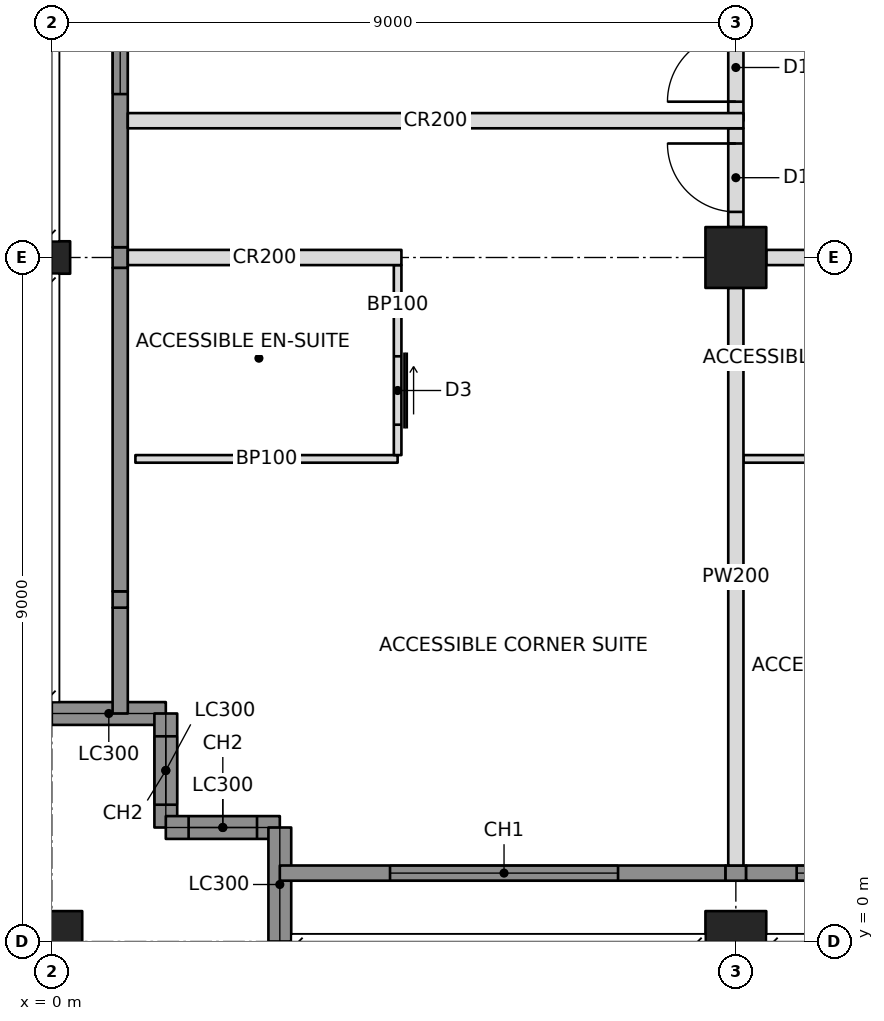
"""IFC4 building model, lengths in metres.
Left out: names, types, materials, properties, quantities, classifications, styles, units other than length and angle.
Written with IfcOpenShell. Run it as: python <this file> out.ifc"""

import sys

from ifc_helpers import new_model, si_unit, direction, frame, frame_2d, origin, origin_with_axes, origin_2d, place, context, subcontext, project, spatial, rectangle, hollow_rectangle, i_section, extrude, element, fill, save


model = new_model("IFC4")
c1 = context("Model", 3, precision=1e-05, world=origin(), true_north=direction((0.0, 1.0)))
c2 = subcontext(c1, "Body", "Model", "MODEL_VIEW")
j1 = project(units=[si_unit("LENGTHUNIT", "METRE"), si_unit("PLANEANGLEUNIT", "RADIAN")], contexts=[c1])
p1 = place(None, origin())
s1 = spatial("IfcSite", under=j1, at=p1, CompositionType="ELEMENT")
p2 = place(p1, origin())
s2 = spatial("IfcBuilding", under=s1, at=p2, CompositionType="ELEMENT")
p3 = place(p2, frame((0.0, 0.0, 197.8)))
s3 = spatial("IfcBuildingStorey", under=s2, at=p3, CompositionType="ELEMENT", Elevation=197.8)
p4 = place(p3, origin_with_axes())
e1 = element("IfcColumn", 1, at=p4, inside=s3, PredefinedType="COLUMN", context=c2, shape_type="SweptSolid", body=[
    extrude(hollow_rectangle(XDim=0.8, YDim=0.8, WallThickness=0.06, at=origin_2d()), origin(), (0.0, 0.0, 1.0), 3.4),
])
p5 = place(p3, frame((0.0, 9.0, 0.0), z_axis=(0.0, 0.0, 1.0), x_axis=(0.0, 1.0, 0.0)))
e2 = element("IfcColumn", 2, at=p5, inside=s3, PredefinedType="COLUMN", context=c2, shape_type="SweptSolid", body=[
    extrude(i_section(OverallWidth=0.427, OverallDepth=0.483, WebThickness=0.051, FlangeThickness=0.082, at=origin_2d()), origin(), (0.0, 0.0, 1.0), 3.4),
])
p6 = place(p3, frame((9.0, 0.0, 0.0), z_axis=(0.0, 0.0, 1.0), x_axis=(1.0, 0.0, 0.0)))
e3 = element("IfcColumn", 3, at=p6, inside=s3, PredefinedType="COLUMN", context=c2, shape_type="SweptSolid", body=[
    extrude(hollow_rectangle(XDim=0.8, YDim=0.8, WallThickness=0.06, at=origin_2d()), origin(), (0.0, 0.0, 1.0), 3.4),
])
p7 = place(p3, frame((9.0, 9.0, 0.0), z_axis=(0.0, 0.0, 1.0), x_axis=(1.0, 0.0, 0.0)))
e4 = element("IfcColumn", 4, at=p7, inside=s3, PredefinedType="COLUMN", context=c2, shape_type="SweptSolid", body=[
    extrude(hollow_rectangle(XDim=0.8, YDim=0.8, WallThickness=0.05, at=origin_2d()), origin(), (0.0, 0.0, 1.0), 3.4),
])
p8 = place(p3, frame((0.0, 3.0, 0.0), z_axis=(0.0, 0.0, 1.0), x_axis=(1.0, 0.0, 0.0)))
e5 = element("IfcWall", 5, at=p8, inside=s3, PredefinedType="SOLIDWALL", context=c2, shape_type="SweptSolid", body=[
    extrude(rectangle(XDim=1.5, YDim=0.3, at=frame_2d((0.75, 0.0))), origin(), (0.0, 0.0, 1.0), 2.42),
])
p9 = place(p3, frame((1.5, 3.0, 0.0), z_axis=(0.0, 0.0, 1.0), x_axis=(0.0, -1.0, 0.0)))
e6 = element("IfcWall", 6, at=p9, inside=s3, PredefinedType="SOLIDWALL", context=c2, shape_type="SweptSolid", body=[
    extrude(rectangle(XDim=1.5, YDim=0.3, at=frame_2d((0.75, 0.0))), origin(), (0.0, 0.0, 1.0), 3.2),
])
p10 = place(p9, frame((0.3, 0.0, 0.6)))
e7 = element("IfcOpeningElement", 7, at=p10, cuts=e6, PredefinedType="OPENING", context=c2, shape_type="SweptSolid", body=[
    extrude(rectangle(XDim=0.9, YDim=2.2, at=frame_2d((0.45, 1.1))), frame((0.0, 0.16, 0.0), z_axis=(0.0, -1.0, 0.0), x_axis=(1.0, 0.0, 0.0)), (0.0, 0.0, 1.0), 0.32),
])
p11 = place(p3, frame((1.5, 1.5, 0.0), z_axis=(0.0, 0.0, 1.0), x_axis=(1.0, 0.0, 0.0)))
e8 = element("IfcWall", 8, at=p11, inside=s3, PredefinedType="SOLIDWALL", context=c2, shape_type="SweptSolid", body=[
    extrude(rectangle(XDim=1.5, YDim=0.3, at=frame_2d((0.75, 0.0))), origin(), (0.0, 0.0, 1.0), 3.2),
])
p12 = place(p11, frame((0.3, 0.0, 0.6)))
e9 = element("IfcOpeningElement", 9, at=p12, cuts=e8, PredefinedType="OPENING", context=c2, shape_type="SweptSolid", body=[
    extrude(rectangle(XDim=0.9, YDim=2.2, at=frame_2d((0.45, 1.1))), frame((0.0, 0.16, 0.0), z_axis=(0.0, -1.0, 0.0), x_axis=(1.0, 0.0, 0.0)), (0.0, 0.0, 1.0), 0.32),
])
p13 = place(p3, frame((3.0, 1.5, 0.0), z_axis=(0.0, 0.0, 1.0), x_axis=(0.0, -1.0, 0.0)))
e10 = element("IfcWall", 10, at=p13, inside=s3, PredefinedType="SOLIDWALL", context=c2, shape_type="SweptSolid", body=[
    extrude(rectangle(XDim=1.5, YDim=0.3, at=frame_2d((0.75, 0.0))), origin(), (0.0, 0.0, 1.0), 2.42),
])
p14 = place(p3, frame((3.0, 0.9, 0.0), z_axis=(0.0, 0.0, 1.0), x_axis=(1.0, 0.0, 0.0)))
e11 = element("IfcWall", 11, at=p14, inside=s3, PredefinedType="SOLIDWALL", context=c2, shape_type="SweptSolid", body=[
    extrude(rectangle(XDim=5.865, YDim=0.2, at=frame_2d((2.932, 0.0))), origin(), (0.0, 0.0, 1.0), 3.2),
])
p15 = place(p14, frame((1.45, 0.0, 0.6)))
e12 = element("IfcOpeningElement", 12, at=p15, cuts=e11, PredefinedType="OPENING", context=c2, shape_type="SweptSolid", body=[
    extrude(rectangle(XDim=3.0, YDim=2.2, at=frame_2d((1.5, 1.1))), frame((0.0, 0.11, 0.0), z_axis=(0.0, -1.0, 0.0), x_axis=(1.0, 0.0, 0.0)), (0.0, 0.0, 1.0), 0.22),
])
p16 = place(p3, frame((0.9, 3.0, 0.0), z_axis=(0.0, 0.0, 1.0), x_axis=(0.0, 1.0, 0.0)))
e13 = element("IfcWall", 13, at=p16, inside=s3, PredefinedType="SOLIDWALL", context=c2, shape_type="SweptSolid", body=[
    extrude(rectangle(XDim=1.393, YDim=0.2, at=frame_2d((0.696, 0.0))), origin(), (0.0, 0.0, 1.0), 3.2),
])
p17 = place(p3, frame((1.0, 9.0, 0.0), z_axis=(0.0, 0.0, 1.0), x_axis=(1.0, 0.0, 0.0)))
e14 = element("IfcWall", 14, at=p17, inside=s3, PredefinedType="PARTITIONING", context=c2, shape_type="SweptSolid", body=[
    extrude(rectangle(XDim=3.6, YDim=0.2, at=frame_2d((1.8, 0.0))), origin(), (0.0, 0.0, 1.0), 2.438),
])
p18 = place(p3, frame((9.4, 9.0, 0.0), z_axis=(0.0, 0.0, 1.0), x_axis=(1.0, 0.0, 0.0)))
e15 = element("IfcWall", 15, at=p18, inside=s3, PredefinedType="PARTITIONING", context=c2, shape_type="SweptSolid", body=[
    extrude(rectangle(XDim=8.2, YDim=0.2, at=frame_2d((4.1, 0.0))), origin(), (0.0, 0.0, 1.0), 2.405),
])
p19 = place(p18, frame((2.95, 0.0, 0.0)))
e16 = element("IfcOpeningElement", 16, at=p19, cuts=e15, PredefinedType="OPENING", context=c2, shape_type="SweptSolid", body=[
    extrude(rectangle(XDim=0.9, YDim=2.1, at=frame_2d((0.45, 1.05))), frame((0.0, 0.11, 0.0), z_axis=(0.0, -1.0, 0.0), x_axis=(1.0, 0.0, 0.0)), (0.0, 0.0, 1.0), 0.22),
])
p20 = place(p18, frame((4.35, 0.0, 0.0)))
e17 = element("IfcOpeningElement", 17, at=p20, cuts=e15, PredefinedType="OPENING", context=c2, shape_type="SweptSolid", body=[
    extrude(rectangle(XDim=0.9, YDim=2.1, at=frame_2d((0.45, 1.05))), frame((0.0, 0.11, 0.0), z_axis=(0.0, -1.0, 0.0), x_axis=(1.0, 0.0, 0.0)), (0.0, 0.0, 1.0), 0.22),
])
p21 = place(p3, frame((9.0, 10.8, 0.0), z_axis=(0.0, 0.0, 1.0), x_axis=(0.0, 1.0, 0.0)))
e18 = element("IfcWall", 18, at=p21, inside=s3, PredefinedType="PARTITIONING", context=c2, shape_type="SweptSolid", body=[
    extrude(rectangle(XDim=6.8, YDim=0.2, at=frame_2d((3.4, 0.0))), origin(), (0.0, 0.0, 1.0), 2.405),
])
p22 = place(p21, frame((0.25, 0.0, 0.0)))
e19 = element("IfcOpeningElement", 19, at=p22, cuts=e18, PredefinedType="OPENING", context=c2, shape_type="SweptSolid", body=[
    extrude(rectangle(XDim=0.9, YDim=2.1, at=frame_2d((0.45, 1.05))), frame((0.0, 0.11, 0.0), z_axis=(0.0, -1.0, 0.0), x_axis=(1.0, 0.0, 0.0)), (0.0, 0.0, 1.0), 0.22),
])
p23 = place(p3, frame((1.0, 10.8, 0.0), z_axis=(0.0, 0.0, 1.0), x_axis=(1.0, 0.0, 0.0)))
e20 = element("IfcWall", 20, at=p23, inside=s3, PredefinedType="PARTITIONING", context=c2, shape_type="SweptSolid", body=[
    extrude(rectangle(XDim=8.1, YDim=0.2, at=frame_2d((4.05, 0.0))), origin(), (0.0, 0.0, 1.0), 2.404),
])
p24 = place(p3, frame((9.0, 8.6, 0.0), z_axis=(0.0, 0.0, 1.0), x_axis=(0.0, -1.0, 0.0)))
e21 = element("IfcWall", 21, at=p24, inside=s3, PredefinedType="PARTITIONING", context=c2, shape_type="SweptSolid", body=[
    extrude(rectangle(XDim=7.6, YDim=0.2, at=frame_2d((3.8, 0.0))), origin(), (0.0, 0.0, 1.0), 2.438),
])
p25 = place(p3, frame((1.1, 6.35, 0.0), z_axis=(0.0, 0.0, 1.0), x_axis=(1.0, 0.0, 0.0)))
e22 = element("IfcWall", 22, at=p25, inside=s3, PredefinedType="PARTITIONING", context=c2, shape_type="SweptSolid", body=[
    extrude(rectangle(XDim=3.45, YDim=0.1, at=frame_2d((1.725, 0.0))), origin(), (0.0, 0.0, 1.0), 3.2),
])
p26 = place(p3, frame((4.55, 8.9, 0.0), z_axis=(0.0, 0.0, 1.0), x_axis=(0.0, -1.0, 0.0)))
e23 = element("IfcWall", 23, at=p26, inside=s3, PredefinedType="PARTITIONING", context=c2, shape_type="SweptSolid", body=[
    extrude(rectangle(XDim=2.5, YDim=0.1, at=frame_2d((1.25, 0.0))), origin(), (0.0, 0.0, 1.0), 2.438),
])
p27 = place(p26, frame((1.2, 0.0, 0.0)))
e24 = element("IfcOpeningElement", 24, at=p27, cuts=e23, PredefinedType="OPENING", context=c2, shape_type="SweptSolid", body=[
    extrude(rectangle(XDim=0.9, YDim=2.1, at=frame_2d((0.45, 1.05))), frame((0.0, 0.06, 0.0), z_axis=(0.0, -1.0, 0.0), x_axis=(1.0, 0.0, 0.0)), (0.0, 0.0, 1.0), 0.12),
])
p28 = place(p3, frame((9.1, 6.35, 0.0), z_axis=(0.0, 0.0, 1.0), x_axis=(1.0, 0.0, 0.0)))
e25 = element("IfcWall", 25, at=p28, inside=s3, PredefinedType="PARTITIONING", context=c2, shape_type="SweptSolid", body=[
    extrude(rectangle(XDim=2.95, YDim=0.1, at=frame_2d((1.475, 0.0))), origin(), (0.0, 0.0, 1.0), 2.438),
])
p29 = place(p3, frame((9.0, 9.4, 0.0), z_axis=(0.0, 0.0, 1.0), x_axis=(0.0, 1.0, 0.0)))
e26 = element("IfcWall", 26, at=p29, inside=s3, PredefinedType="PARTITIONING", context=c2, shape_type="SweptSolid", body=[
    extrude(rectangle(XDim=1.3, YDim=0.2, at=frame_2d((0.65, 0.0))), origin(), (0.0, 0.0, 1.0), 2.405),
])
p30 = place(p29, frame((0.2, 0.0, 0.0)))
e27 = element("IfcOpeningElement", 27, at=p30, cuts=e26, PredefinedType="OPENING", context=c2, shape_type="SweptSolid", body=[
    extrude(rectangle(XDim=0.9, YDim=2.1, at=frame_2d((0.45, 1.05))), frame((0.0, 0.11, 0.0), z_axis=(0.0, -1.0, 0.0), x_axis=(1.0, 0.0, 0.0)), (0.0, 0.0, 1.0), 0.22),
])
p31 = place(p3, frame((8.865, 0.9, 0.0), z_axis=(0.0, 0.0, 1.0), x_axis=(1.0, 0.0, 0.0)))
e28 = element("IfcWall", 28, at=p31, inside=s3, PredefinedType="SOLIDWALL", context=c2, shape_type="SweptSolid", body=[
    extrude(rectangle(XDim=0.271, YDim=0.2, at=frame_2d((0.135, 0.0))), origin(), (0.0, 0.0, 1.0), 2.438),
])
p32 = place(p3, frame((9.135, 0.9, 0.0), z_axis=(0.0, 0.0, 1.0), x_axis=(1.0, 0.0, 0.0)))
e29 = element("IfcWall", 29, at=p32, inside=s3, PredefinedType="SOLIDWALL", context=c2, shape_type="SweptSolid", body=[
    extrude(rectangle(XDim=8.671, YDim=0.2, at=frame_2d((4.335, 0.0))), origin(), (0.0, 0.0, 1.0), 3.2),
])
p33 = place(p32, frame((0.665, 0.0, 0.6)))
e30 = element("IfcOpeningElement", 30, at=p33, cuts=e29, PredefinedType="OPENING", context=c2, shape_type="SweptSolid", body=[
    extrude(rectangle(XDim=3.0, YDim=2.2, at=frame_2d((1.5, 1.1))), frame((0.0, 0.11, 0.0), z_axis=(0.0, -1.0, 0.0), x_axis=(1.0, 0.0, 0.0)), (0.0, 0.0, 1.0), 0.22),
])
p34 = place(p32, frame((5.065, 0.0, 0.6)))
e31 = element("IfcOpeningElement", 31, at=p34, cuts=e29, PredefinedType="OPENING", context=c2, shape_type="SweptSolid", body=[
    extrude(rectangle(XDim=3.0, YDim=2.2, at=frame_2d((1.5, 1.1))), frame((0.0, 0.11, 0.0), z_axis=(0.0, -1.0, 0.0), x_axis=(1.0, 0.0, 0.0)), (0.0, 0.0, 1.0), 0.22),
])
p35 = place(p3, frame((0.9, 4.393, 0.0), z_axis=(0.0, 0.0, 1.0), x_axis=(0.0, 1.0, 0.0)))
e32 = element("IfcWall", 32, at=p35, inside=s3, PredefinedType="SOLIDWALL", context=c2, shape_type="SweptSolid", body=[
    extrude(rectangle(XDim=0.215, YDim=0.2, at=frame_2d((0.107, 0.0))), origin(), (0.0, 0.0, 1.0), 2.661),
])
p36 = place(p3, frame((0.9, 4.607, 0.0), z_axis=(0.0, 0.0, 1.0), x_axis=(0.0, 1.0, 0.0)))
e33 = element("IfcWall", 33, at=p36, inside=s3, PredefinedType="SOLIDWALL", context=c2, shape_type="SweptSolid", body=[
    extrude(rectangle(XDim=4.257, YDim=0.2, at=frame_2d((2.129, 0.0))), origin(), (0.0, 0.0, 1.0), 3.2),
])
p37 = place(p3, frame((0.9, 8.865, 0.0), z_axis=(0.0, 0.0, 1.0), x_axis=(0.0, 1.0, 0.0)))
e34 = element("IfcWall", 34, at=p37, inside=s3, PredefinedType="SOLIDWALL", context=c2, shape_type="SweptSolid", body=[
    extrude(rectangle(XDim=0.271, YDim=0.2, at=frame_2d((0.135, 0.0))), origin(), (0.0, 0.0, 1.0), 2.438),
])
p38 = place(p3, frame((0.9, 9.135, 0.0), z_axis=(0.0, 0.0, 1.0), x_axis=(0.0, 1.0, 0.0)))
e35 = element("IfcWall", 35, at=p38, inside=s3, PredefinedType="SOLIDWALL", context=c2, shape_type="SweptSolid", body=[
    extrude(rectangle(XDim=8.671, YDim=0.2, at=frame_2d((4.335, 0.0))), origin(), (0.0, 0.0, 1.0), 3.2),
])
p39 = place(p38, frame((2.015, 0.0, 0.6)))
e36 = element("IfcOpeningElement", 36, at=p39, cuts=e35, PredefinedType="OPENING", context=c2, shape_type="SweptSolid", body=[
    extrude(rectangle(XDim=3.0, YDim=2.2, at=frame_2d((1.5, 1.1))), frame((0.0, 0.11, 0.0), z_axis=(0.0, -1.0, 0.0), x_axis=(1.0, 0.0, 0.0)), (0.0, 0.0, 1.0), 0.22),
])
p40 = place(p38, frame((5.515, 0.0, 0.6)))
e37 = element("IfcOpeningElement", 37, at=p40, cuts=e35, PredefinedType="OPENING", context=c2, shape_type="SweptSolid", body=[
    extrude(rectangle(XDim=3.0, YDim=2.2, at=frame_2d((1.5, 1.1))), frame((0.0, 0.11, 0.0), z_axis=(0.0, -1.0, 0.0), x_axis=(1.0, 0.0, 0.0)), (0.0, 0.0, 1.0), 0.22),
])
p41 = place(p10, origin())
e38 = element("IfcWindow", 38, at=p41, inside=s3, PartitioningType="SINGLE_PANEL", PredefinedType="WINDOW", context=c2, shape_type="SweptSolid", body=[
    extrude(rectangle(XDim=0.9, YDim=2.2, at=frame_2d((0.45, 1.1))), frame((0.0, 0.03, 0.0), z_axis=(0.0, -1.0, 0.0), x_axis=(1.0, 0.0, 0.0)), (0.0, 0.0, 1.0), 0.06),
])
fill(e7, e38)
p42 = place(p12, origin())
e39 = element("IfcWindow", 39, at=p42, inside=s3, PartitioningType="SINGLE_PANEL", PredefinedType="WINDOW", context=c2, shape_type="SweptSolid", body=[
    extrude(rectangle(XDim=0.9, YDim=2.2, at=frame_2d((0.45, 1.1))), frame((0.0, 0.03, 0.0), z_axis=(0.0, -1.0, 0.0), x_axis=(1.0, 0.0, 0.0)), (0.0, 0.0, 1.0), 0.06),
])
fill(e9, e39)
p43 = place(p15, origin())
e40 = element("IfcWindow", 40, at=p43, inside=s3, PartitioningType="TRIPLE_PANEL_VERTICAL", PredefinedType="WINDOW", context=c2, shape_type="SweptSolid", body=[
    extrude(rectangle(XDim=3.0, YDim=2.2, at=frame_2d((1.5, 1.1))), frame((0.0, 0.03, 0.0), z_axis=(0.0, -1.0, 0.0), x_axis=(1.0, 0.0, 0.0)), (0.0, 0.0, 1.0), 0.06),
])
fill(e12, e40)
p44 = place(p33, origin())
e41 = element("IfcWindow", 41, at=p44, inside=s3, PartitioningType="TRIPLE_PANEL_VERTICAL", PredefinedType="WINDOW", context=c2, shape_type="SweptSolid", body=[
    extrude(rectangle(XDim=3.0, YDim=2.2, at=frame_2d((1.5, 1.1))), frame((0.0, 0.03, 0.0), z_axis=(0.0, -1.0, 0.0), x_axis=(1.0, 0.0, 0.0)), (0.0, 0.0, 1.0), 0.06),
])
fill(e30, e41)
p45 = place(p39, origin())
e42 = element("IfcWindow", 42, at=p45, inside=s3, PartitioningType="TRIPLE_PANEL_VERTICAL", PredefinedType="WINDOW", context=c2, shape_type="SweptSolid", body=[
    extrude(rectangle(XDim=3.0, YDim=2.2, at=frame_2d((1.5, 1.1))), frame((0.0, 0.03, 0.0), z_axis=(0.0, -1.0, 0.0), x_axis=(1.0, 0.0, 0.0)), (0.0, 0.0, 1.0), 0.06),
])
fill(e36, e42)
p46 = place(p27, origin())
e43 = element("IfcDoor", 43, at=p46, inside=s3, OperationType="SLIDING_TO_LEFT", PredefinedType="DOOR", context=c2, shape_type="SweptSolid", body=[
    extrude(rectangle(XDim=0.9, YDim=2.1, at=frame_2d((0.45, 1.05))), frame((0.0, 0.025, 0.0), z_axis=(0.0, -1.0, 0.0), x_axis=(1.0, 0.0, 0.0)), (0.0, 0.0, 1.0), 0.05),
])
fill(e24, e43)
p47 = place(p22, origin())
e44 = element("IfcDoor", 44, at=p47, inside=s3, OperationType="SINGLE_SWING_LEFT", PredefinedType="DOOR", context=c2, shape_type="SweptSolid", body=[
    extrude(rectangle(XDim=0.9, YDim=2.1, at=frame_2d((0.45, 1.05))), frame((0.0, 0.025, 0.0), z_axis=(0.0, -1.0, 0.0), x_axis=(1.0, 0.0, 0.0)), (0.0, 0.0, 1.0), 0.05),
])
fill(e19, e44)
p48 = place(p30, origin())
e45 = element("IfcDoor", 45, at=p48, inside=s3, OperationType="SINGLE_SWING_RIGHT", PredefinedType="DOOR", context=c2, shape_type="SweptSolid", body=[
    extrude(rectangle(XDim=0.9, YDim=2.1, at=frame_2d((0.45, 1.05))), frame((0.0, 0.025, 0.0), z_axis=(0.0, -1.0, 0.0), x_axis=(1.0, 0.0, 0.0)), (0.0, 0.0, 1.0), 0.05),
])
fill(e27, e45)
save(model, sys.argv[1])
